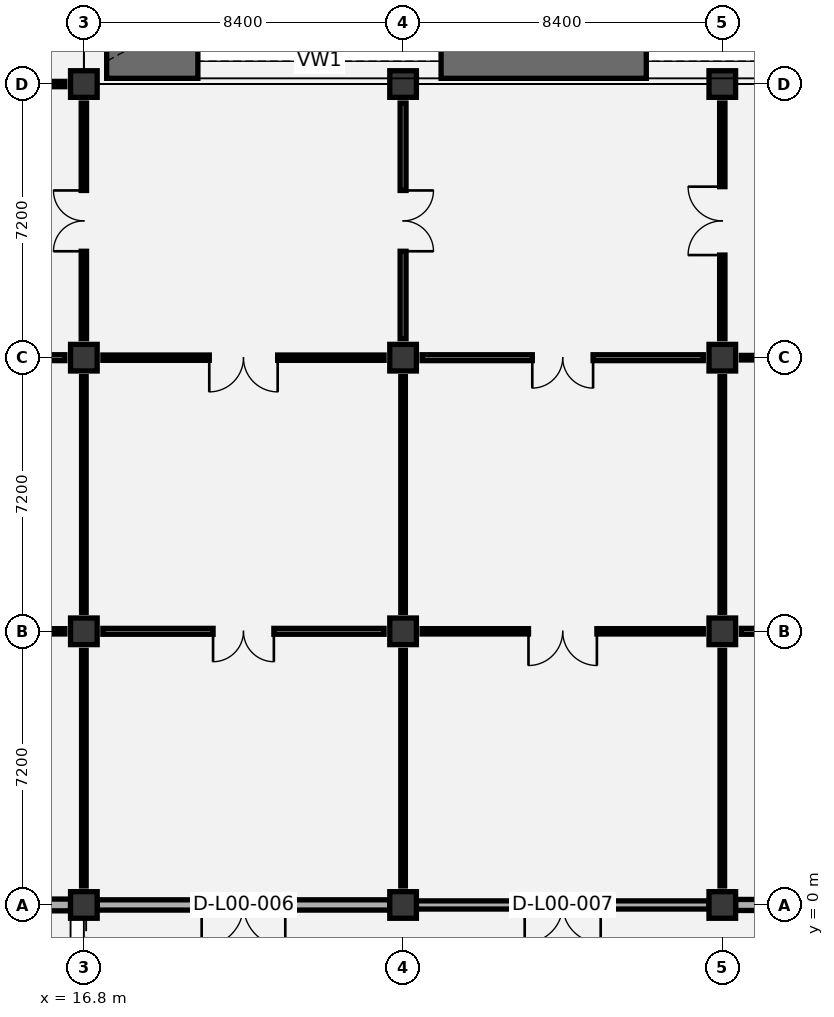
"""IFC4 building model, lengths in metres.
Left out: names, types, materials, properties, quantities, classifications, styles, units other than length and angle.
Written with IfcOpenShell. Run it as: python <this file> out.ifc"""

import sys

from ifc_helpers import new_model, si_unit, direction, frame, frame_2d, origin, origin_2d, place, context, subcontext, project, spatial, rectangle, extrude, element, fill, save


model = new_model("IFC4")
c1 = context("Model", 3, precision=1e-05, world=origin(), true_north=direction((0.0, 1.0)))
c2 = subcontext(c1, "Body", "Model", "MODEL_VIEW")
j1 = project(units=[si_unit("LENGTHUNIT", "METRE"), si_unit("PLANEANGLEUNIT", "RADIAN")], contexts=[c1])
p1 = place(None, origin())
s1 = spatial("IfcSite", under=j1, at=p1, CompositionType="ELEMENT")
p2 = place(p1, origin())
s2 = spatial("IfcBuilding", under=s1, at=p2, CompositionType="ELEMENT")
p3 = place(p2, origin())
s3 = spatial("IfcBuildingStorey", under=s2, at=p3, CompositionType="ELEMENT", Elevation=0.0)
for number, where, z_axis, x_axis in (
    (1, (16.8, 0.0, 0.0), (0.0, 0.0, 1.0), (1.0, 0.0, 0.0)),
    (2, (16.8, 7.2, 0.0), (0.0, 0.0, 1.0), (1.0, 0.0, 0.0)),
    (3, (16.8, 14.4, 0.0), (0.0, 0.0, 1.0), (1.0, 0.0, 0.0)),
    (4, (16.8, 21.6, 0.0), (0.0, 0.0, 1.0), (1.0, 0.0, 0.0)),
    (5, (25.2, 0.0, 0.0), (0.0, 0.0, 1.0), (1.0, 0.0, 0.0)),
    (6, (25.2, 7.2, 0.0), (0.0, 0.0, 1.0), (1.0, 0.0, 0.0)),
    (7, (25.2, 14.4, 0.0), (0.0, 0.0, 1.0), (1.0, 0.0, 0.0)),
    (8, (25.2, 21.6, 0.0), (0.0, 0.0, 1.0), (1.0, 0.0, 0.0)),
    (9, (33.6, 0.0, 0.0), (0.0, 0.0, 1.0), (1.0, 0.0, 0.0)),
    (10, (33.6, 7.2, 0.0), (0.0, 0.0, 1.0), (1.0, 0.0, 0.0)),
    (11, (33.6, 14.4, 0.0), (0.0, 0.0, 1.0), (1.0, 0.0, 0.0)),
    (12, (33.6, 21.6, 0.0), (0.0, 0.0, 1.0), (1.0, 0.0, 0.0)),
):
    element("IfcColumn", number, at=place(p3, frame(where, z_axis=z_axis, x_axis=x_axis)), inside=s3, PredefinedType="COLUMN", context=c2, shape_type="SweptSolid", body=[
        extrude(rectangle(XDim=0.7, YDim=0.7, at=origin_2d()), origin(), (0.0, 0.0, 1.0), 6.0),
    ])
p4 = place(p3, frame((17.4, 22.2, 0.0), z_axis=(0.0, 0.0, 1.0), x_axis=(1.0, 0.0, 0.0)))
e13 = element("IfcWall", 13, at=p4, inside=s3, PredefinedType="SOLIDWALL", context=c2, shape_type="SweptSolid", body=[
    extrude(rectangle(XDim=24.0, YDim=0.9, at=frame_2d((12.0, 0.0))), origin(), (0.0, 0.0, 1.0), 6.0),
])
p5 = place(p4, frame((2.4, 0.0, 0.8)))
e14 = element("IfcOpeningElement", 14, at=p5, cuts=e13, PredefinedType="OPENING", context=c2, shape_type="SweptSolid", body=[
    extrude(rectangle(XDim=6.4, YDim=3.2, at=frame_2d((3.2, 1.6))), frame((0.0, 0.46, 0.0), z_axis=(0.0, -1.0, 0.0), x_axis=(1.0, 0.0, 0.0)), (0.0, 0.0, 1.0), 0.92),
])
p6 = place(p4, frame((14.2, 0.0, 0.8)))
e15 = element("IfcOpeningElement", 15, at=p6, cuts=e13, PredefinedType="OPENING", context=c2, shape_type="SweptSolid", body=[
    extrude(rectangle(XDim=6.4, YDim=3.2, at=frame_2d((3.2, 1.6))), frame((0.0, 0.46, 0.0), z_axis=(0.0, -1.0, 0.0), x_axis=(1.0, 0.0, 0.0)), (0.0, 0.0, 1.0), 0.92),
])
p7 = place(p3, frame((8.75, 0.0, 0.0), z_axis=(0.0, 0.0, 1.0), x_axis=(1.0, 0.0, 0.0)))
e16 = element("IfcWall", 16, at=p7, inside=s3, PredefinedType="SOLIDWALL", context=c2, shape_type="SweptSolid", body=[
    extrude(rectangle(XDim=7.7, YDim=0.31, at=frame_2d((3.85, 0.0))), origin(), (0.0, 0.0, 1.0), 5.12),
])
p8 = place(p7, frame((3.05, 0.0, 0.0)))
e17 = element("IfcOpeningElement", 17, at=p8, cuts=e16, PredefinedType="OPENING", context=c2, shape_type="SweptSolid", body=[
    extrude(rectangle(XDim=1.6, YDim=2.25, at=frame_2d((0.8, 1.125))), frame((0.0, 0.165, 0.0), z_axis=(0.0, -1.0, 0.0), x_axis=(1.0, 0.0, 0.0)), (0.0, 0.0, 1.0), 0.33),
])
p9 = place(p3, frame((17.15, 0.0, 0.0), z_axis=(0.0, 0.0, 1.0), x_axis=(1.0, 0.0, 0.0)))
e18 = element("IfcWall", 18, at=p9, inside=s3, PredefinedType="SOLIDWALL", context=c2, shape_type="SweptSolid", body=[
    extrude(rectangle(XDim=7.7, YDim=0.27, at=frame_2d((3.85, 0.0))), origin(), (0.0, 0.0, 1.0), 5.02),
])
p10 = place(p9, frame((2.75, 0.0, 0.0)))
e19 = element("IfcOpeningElement", 19, at=p10, cuts=e18, PredefinedType="OPENING", context=c2, shape_type="SweptSolid", body=[
    extrude(rectangle(XDim=2.2, YDim=2.45, at=frame_2d((1.1, 1.225))), frame((0.0, 0.145, 0.0), z_axis=(0.0, -1.0, 0.0), x_axis=(1.0, 0.0, 0.0)), (0.0, 0.0, 1.0), 0.29),
])
p11 = place(p3, frame((25.55, 0.0, 0.0), z_axis=(0.0, 0.0, 1.0), x_axis=(1.0, 0.0, 0.0)))
e20 = element("IfcWall", 20, at=p11, inside=s3, PredefinedType="SOLIDWALL", context=c2, shape_type="SweptSolid", body=[
    extrude(rectangle(XDim=7.7, YDim=0.215, at=frame_2d((3.85, 0.0))), origin(), (0.0, 0.0, 1.0), 5.02),
])
p12 = place(p11, frame((2.85, 0.0, 0.0)))
e21 = element("IfcOpeningElement", 21, at=p12, cuts=e20, PredefinedType="OPENING", context=c2, shape_type="SweptSolid", body=[
    extrude(rectangle(XDim=2.0, YDim=2.4, at=frame_2d((1.0, 1.2))), frame((0.0, 0.117, 0.0), z_axis=(0.0, -1.0, 0.0), x_axis=(1.0, 0.0, 0.0)), (0.0, 0.0, 1.0), 0.235),
])
p13 = place(p3, frame((33.95, 0.0, 0.0), z_axis=(0.0, 0.0, 1.0), x_axis=(1.0, 0.0, 0.0)))
e22 = element("IfcWall", 22, at=p13, inside=s3, PredefinedType="SOLIDWALL", context=c2, shape_type="SweptSolid", body=[
    extrude(rectangle(XDim=7.7, YDim=0.29, at=frame_2d((3.85, 0.0))), origin(), (0.0, 0.0, 1.0), 5.02),
])
p14 = place(p13, frame((2.95, 0.0, 0.0)))
e23 = element("IfcOpeningElement", 23, at=p14, cuts=e22, PredefinedType="OPENING", context=c2, shape_type="SweptSolid", body=[
    extrude(rectangle(XDim=1.8, YDim=2.35, at=frame_2d((0.9, 1.175))), frame((0.0, 0.155, 0.0), z_axis=(0.0, -1.0, 0.0), x_axis=(1.0, 0.0, 0.0)), (0.0, 0.0, 1.0), 0.31),
])
p15 = place(p3, frame((16.8, 0.5, 0.0), z_axis=(0.0, 0.0, 1.0), x_axis=(0.0, 1.0, 0.0)))
e24 = element("IfcWall", 24, at=p15, inside=s3, PredefinedType="PARTITIONING", context=c2, shape_type="SweptSolid", body=[
    extrude(rectangle(XDim=6.2, YDim=0.12, at=frame_2d((3.1, 0.0))), origin(), (0.0, 0.0, 1.0), 5.38),
])
p16 = place(p3, frame((8.9, 7.2, 0.0), z_axis=(0.0, 0.0, 1.0), x_axis=(1.0, 0.0, 0.0)))
e25 = element("IfcWall", 25, at=p16, inside=s3, PredefinedType="PARTITIONING", context=c2, shape_type="SweptSolid", body=[
    extrude(rectangle(XDim=7.4, YDim=0.14, at=frame_2d((3.7, 0.0))), origin(), (0.0, 0.0, 1.0), 4.97),
])
p17 = place(p16, frame((2.9, 0.0, 0.0)))
e26 = element("IfcOpeningElement", 26, at=p17, cuts=e25, PredefinedType="OPENING", context=c2, shape_type="SweptSolid", body=[
    extrude(rectangle(XDim=1.6, YDim=2.2, at=frame_2d((0.8, 1.1))), frame((0.0, 0.08, 0.0), z_axis=(0.0, -1.0, 0.0), x_axis=(1.0, 0.0, 0.0)), (0.0, 0.0, 1.0), 0.16),
])
p18 = place(p3, frame((16.8, 7.7, 0.0), z_axis=(0.0, 0.0, 1.0), x_axis=(0.0, 1.0, 0.0)))
e27 = element("IfcWall", 27, at=p18, inside=s3, PredefinedType="PARTITIONING", context=c2, shape_type="SweptSolid", body=[
    extrude(rectangle(XDim=6.2, YDim=0.12, at=frame_2d((3.1, 0.0))), origin(), (0.0, 0.0, 1.0), 4.92),
])
p19 = place(p3, frame((8.9, 14.4, 0.0), z_axis=(0.0, 0.0, 1.0), x_axis=(1.0, 0.0, 0.0)))
e28 = element("IfcWall", 28, at=p19, inside=s3, PredefinedType="PARTITIONING", context=c2, shape_type="SweptSolid", body=[
    extrude(rectangle(XDim=7.4, YDim=0.155, at=frame_2d((3.7, 0.0))), origin(), (0.0, 0.0, 1.0), 4.87),
])
p20 = place(p19, frame((2.8, 0.0, 0.0)))
e29 = element("IfcOpeningElement", 29, at=p20, cuts=e28, PredefinedType="OPENING", context=c2, shape_type="SweptSolid", body=[
    extrude(rectangle(XDim=1.8, YDim=2.25, at=frame_2d((0.9, 1.125))), frame((0.0, 0.087, 0.0), z_axis=(0.0, -1.0, 0.0), x_axis=(1.0, 0.0, 0.0)), (0.0, 0.0, 1.0), 0.175),
])
p21 = place(p3, frame((16.8, 14.9, 0.0), z_axis=(0.0, 0.0, 1.0), x_axis=(0.0, 1.0, 0.0)))
e30 = element("IfcWall", 30, at=p21, inside=s3, PredefinedType="PARTITIONING", context=c2, shape_type="SweptSolid", body=[
    extrude(rectangle(XDim=6.2, YDim=0.14, at=frame_2d((3.1, 0.0))), origin(), (0.0, 0.0, 1.0), 5.02),
])
p22 = place(p21, frame((2.3, 0.0, 0.0)))
e31 = element("IfcOpeningElement", 31, at=p22, cuts=e30, PredefinedType="OPENING", context=c2, shape_type="SweptSolid", body=[
    extrude(rectangle(XDim=1.6, YDim=2.2, at=frame_2d((0.8, 1.1))), frame((0.0, 0.08, 0.0), z_axis=(0.0, -1.0, 0.0), x_axis=(1.0, 0.0, 0.0)), (0.0, 0.0, 1.0), 0.16),
])
p23 = place(p3, frame((8.9, 21.6, 0.0), z_axis=(0.0, 0.0, 1.0), x_axis=(1.0, 0.0, 0.0)))
e32 = element("IfcWall", 32, at=p23, inside=s3, PredefinedType="PARTITIONING", context=c2, shape_type="SweptSolid", body=[
    extrude(rectangle(XDim=7.4, YDim=0.14, at=frame_2d((3.7, 0.0))), origin(), (0.0, 0.0, 1.0), 4.87),
])
p24 = place(p23, frame((2.8, 0.0, 0.0)))
e33 = element("IfcOpeningElement", 33, at=p24, cuts=e32, PredefinedType="OPENING", context=c2, shape_type="SweptSolid", body=[
    extrude(rectangle(XDim=1.8, YDim=2.25, at=frame_2d((0.9, 1.125))), frame((0.0, 0.08, 0.0), z_axis=(0.0, -1.0, 0.0), x_axis=(1.0, 0.0, 0.0)), (0.0, 0.0, 1.0), 0.16),
])
p25 = place(p3, frame((25.2, 0.5, 0.0), z_axis=(0.0, 0.0, 1.0), x_axis=(0.0, 1.0, 0.0)))
e34 = element("IfcWall", 34, at=p25, inside=s3, PredefinedType="PARTITIONING", context=c2, shape_type="SweptSolid", body=[
    extrude(rectangle(XDim=6.2, YDim=0.12, at=frame_2d((3.1, 0.0))), origin(), (0.0, 0.0, 1.0), 4.92),
])
p26 = place(p3, frame((17.3, 7.2, 0.0), z_axis=(0.0, 0.0, 1.0), x_axis=(1.0, 0.0, 0.0)))
e35 = element("IfcWall", 35, at=p26, inside=s3, PredefinedType="PARTITIONING", context=c2, shape_type="SweptSolid", body=[
    extrude(rectangle(XDim=7.4, YDim=0.155, at=frame_2d((3.7, 0.0))), origin(), (0.0, 0.0, 1.0), 4.87),
])
p27 = place(p26, frame((2.9, 0.0, 0.0)))
e36 = element("IfcOpeningElement", 36, at=p27, cuts=e35, PredefinedType="OPENING", context=c2, shape_type="SweptSolid", body=[
    extrude(rectangle(XDim=1.6, YDim=2.2, at=frame_2d((0.8, 1.1))), frame((0.0, 0.087, 0.0), z_axis=(0.0, -1.0, 0.0), x_axis=(1.0, 0.0, 0.0)), (0.0, 0.0, 1.0), 0.175),
])
p28 = place(p3, frame((25.2, 7.7, 0.0), z_axis=(0.0, 0.0, 1.0), x_axis=(0.0, 1.0, 0.0)))
e37 = element("IfcWall", 37, at=p28, inside=s3, PredefinedType="PARTITIONING", context=c2, shape_type="SweptSolid", body=[
    extrude(rectangle(XDim=6.2, YDim=0.12, at=frame_2d((3.1, 0.0))), origin(), (0.0, 0.0, 1.0), 5.17),
])
p29 = place(p3, frame((17.3, 14.4, 0.0), z_axis=(0.0, 0.0, 1.0), x_axis=(1.0, 0.0, 0.0)))
e38 = element("IfcWall", 38, at=p29, inside=s3, PredefinedType="PARTITIONING", context=c2, shape_type="SweptSolid", body=[
    extrude(rectangle(XDim=7.4, YDim=0.14, at=frame_2d((3.7, 0.0))), origin(), (0.0, 0.0, 1.0), 5.02),
])
p30 = place(p29, frame((2.8, 0.0, 0.0)))
e39 = element("IfcOpeningElement", 39, at=p30, cuts=e38, PredefinedType="OPENING", context=c2, shape_type="SweptSolid", body=[
    extrude(rectangle(XDim=1.8, YDim=2.25, at=frame_2d((0.9, 1.125))), frame((0.0, 0.08, 0.0), z_axis=(0.0, -1.0, 0.0), x_axis=(1.0, 0.0, 0.0)), (0.0, 0.0, 1.0), 0.16),
])
p31 = place(p3, frame((25.2, 14.9, 0.0), z_axis=(0.0, 0.0, 1.0), x_axis=(0.0, 1.0, 0.0)))
e40 = element("IfcWall", 40, at=p31, inside=s3, PredefinedType="PARTITIONING", context=c2, shape_type="SweptSolid", body=[
    extrude(rectangle(XDim=6.2, YDim=0.155, at=frame_2d((3.1, 0.0))), origin(), (0.0, 0.0, 1.0), 5.775),
])
p32 = place(p31, frame((2.3, 0.0, 0.0)))
e41 = element("IfcOpeningElement", 41, at=p32, cuts=e40, PredefinedType="OPENING", context=c2, shape_type="SweptSolid", body=[
    extrude(rectangle(XDim=1.6, YDim=2.2, at=frame_2d((0.8, 1.1))), frame((0.0, 0.087, 0.0), z_axis=(0.0, -1.0, 0.0), x_axis=(1.0, 0.0, 0.0)), (0.0, 0.0, 1.0), 0.175),
])
p33 = place(p3, frame((33.6, 0.5, 0.0), z_axis=(0.0, 0.0, 1.0), x_axis=(0.0, 1.0, 0.0)))
e42 = element("IfcWall", 42, at=p33, inside=s3, PredefinedType="PARTITIONING", context=c2, shape_type="SweptSolid", body=[
    extrude(rectangle(XDim=6.2, YDim=0.12, at=frame_2d((3.1, 0.0))), origin(), (0.0, 0.0, 1.0), 5.17),
])
p34 = place(p3, frame((25.7, 7.2, 0.0), z_axis=(0.0, 0.0, 1.0), x_axis=(1.0, 0.0, 0.0)))
e43 = element("IfcWall", 43, at=p34, inside=s3, PredefinedType="PARTITIONING", context=c2, shape_type="SweptSolid", body=[
    extrude(rectangle(XDim=7.4, YDim=0.14, at=frame_2d((3.7, 0.0))), origin(), (0.0, 0.0, 1.0), 4.87),
])
p35 = place(p34, frame((2.8, 0.0, 0.0)))
e44 = element("IfcOpeningElement", 44, at=p35, cuts=e43, PredefinedType="OPENING", context=c2, shape_type="SweptSolid", body=[
    extrude(rectangle(XDim=1.8, YDim=2.25, at=frame_2d((0.9, 1.125))), frame((0.0, 0.08, 0.0), z_axis=(0.0, -1.0, 0.0), x_axis=(1.0, 0.0, 0.0)), (0.0, 0.0, 1.0), 0.16),
])
p36 = place(p3, frame((33.6, 7.7, 0.0), z_axis=(0.0, 0.0, 1.0), x_axis=(0.0, 1.0, 0.0)))
e45 = element("IfcWall", 45, at=p36, inside=s3, PredefinedType="PARTITIONING", context=c2, shape_type="SweptSolid", body=[
    extrude(rectangle(XDim=6.2, YDim=0.12, at=frame_2d((3.1, 0.0))), origin(), (0.0, 0.0, 1.0), 4.92),
])
p37 = place(p3, frame((25.7, 14.4, 0.0), z_axis=(0.0, 0.0, 1.0), x_axis=(1.0, 0.0, 0.0)))
e46 = element("IfcWall", 46, at=p37, inside=s3, PredefinedType="PARTITIONING", context=c2, shape_type="SweptSolid", body=[
    extrude(rectangle(XDim=7.4, YDim=0.155, at=frame_2d((3.7, 0.0))), origin(), (0.0, 0.0, 1.0), 5.02),
])
p38 = place(p37, frame((2.9, 0.0, 0.0)))
e47 = element("IfcOpeningElement", 47, at=p38, cuts=e46, PredefinedType="OPENING", context=c2, shape_type="SweptSolid", body=[
    extrude(rectangle(XDim=1.6, YDim=2.2, at=frame_2d((0.8, 1.1))), frame((0.0, 0.087, 0.0), z_axis=(0.0, -1.0, 0.0), x_axis=(1.0, 0.0, 0.0)), (0.0, 0.0, 1.0), 0.175),
])
p39 = place(p3, frame((33.6, 14.9, 0.0), z_axis=(0.0, 0.0, 1.0), x_axis=(0.0, 1.0, 0.0)))
e48 = element("IfcWall", 48, at=p39, inside=s3, PredefinedType="PARTITIONING", context=c2, shape_type="SweptSolid", body=[
    extrude(rectangle(XDim=6.2, YDim=0.14, at=frame_2d((3.1, 0.0))), origin(), (0.0, 0.0, 1.0), 5.775),
])
p40 = place(p39, frame((2.2, 0.0, 0.0)))
e49 = element("IfcOpeningElement", 49, at=p40, cuts=e48, PredefinedType="OPENING", context=c2, shape_type="SweptSolid", body=[
    extrude(rectangle(XDim=1.8, YDim=2.25, at=frame_2d((0.9, 1.125))), frame((0.0, 0.08, 0.0), z_axis=(0.0, -1.0, 0.0), x_axis=(1.0, 0.0, 0.0)), (0.0, 0.0, 1.0), 0.16),
])
p41 = place(p3, frame((34.1, 7.2, 0.0), z_axis=(0.0, 0.0, 1.0), x_axis=(1.0, 0.0, 0.0)))
e50 = element("IfcWall", 50, at=p41, inside=s3, PredefinedType="PARTITIONING", context=c2, shape_type="SweptSolid", body=[
    extrude(rectangle(XDim=7.4, YDim=0.155, at=frame_2d((3.7, 0.0))), origin(), (0.0, 0.0, 1.0), 4.87),
])
p42 = place(p41, frame((2.8, 0.0, 0.0)))
e51 = element("IfcOpeningElement", 51, at=p42, cuts=e50, PredefinedType="OPENING", context=c2, shape_type="SweptSolid", body=[
    extrude(rectangle(XDim=1.8, YDim=2.25, at=frame_2d((0.9, 1.125))), frame((0.0, 0.087, 0.0), z_axis=(0.0, -1.0, 0.0), x_axis=(1.0, 0.0, 0.0)), (0.0, 0.0, 1.0), 0.175),
])
p43 = place(p3, frame((34.1, 14.4, 0.0), z_axis=(0.0, 0.0, 1.0), x_axis=(1.0, 0.0, 0.0)))
e52 = element("IfcWall", 52, at=p43, inside=s3, PredefinedType="PARTITIONING", context=c2, shape_type="SweptSolid", body=[
    extrude(rectangle(XDim=7.4, YDim=0.12, at=frame_2d((3.7, 0.0))), origin(), (0.0, 0.0, 1.0), 5.02),
])
p44 = place(p10, frame((2.2, 0.0, 0.0), z_axis=(0.0, 0.0, 1.0), x_axis=(-1.0, 0.0, 0.0)))
e53 = element("IfcDoor", 53, at=p44, inside=s3, OperationType="DOUBLE_DOOR_SINGLE_SWING", PredefinedType="DOOR", context=c2, shape_type="SweptSolid", body=[
    extrude(rectangle(XDim=2.2, YDim=2.45, at=frame_2d((1.1, 1.225))), frame((0.0, 0.025, 0.0), z_axis=(0.0, -1.0, 0.0), x_axis=(1.0, 0.0, 0.0)), (0.0, 0.0, 1.0), 0.05),
])
fill(e19, e53)
p45 = place(p12, frame((2.0, 0.0, 0.0), z_axis=(0.0, 0.0, 1.0), x_axis=(-1.0, 0.0, 0.0)))
e54 = element("IfcDoor", 54, at=p45, inside=s3, OperationType="DOUBLE_DOOR_SINGLE_SWING", PredefinedType="DOOR", context=c2, shape_type="SweptSolid", body=[
    extrude(rectangle(XDim=2.0, YDim=2.4, at=frame_2d((1.0, 1.2))), frame((0.0, 0.025, 0.0), z_axis=(0.0, -1.0, 0.0), x_axis=(1.0, 0.0, 0.0)), (0.0, 0.0, 1.0), 0.05),
])
fill(e21, e54)
p46 = place(p5, origin())
e55 = element("IfcWindow", 55, at=p46, inside=s3, PartitioningType="SINGLE_PANEL", PredefinedType="WINDOW", context=c2, shape_type="SweptSolid", body=[
    extrude(rectangle(XDim=6.4, YDim=3.2, at=frame_2d((3.2, 1.6))), frame((0.0, 0.175, 0.0), z_axis=(0.0, -1.0, 0.0), x_axis=(1.0, 0.0, 0.0)), (0.0, 0.0, 1.0), 0.35),
])
fill(e14, e55)
p47 = place(p6, origin())
e56 = element("IfcWindow", 56, at=p47, inside=s3, PartitioningType="SINGLE_PANEL", PredefinedType="WINDOW", context=c2, shape_type="SweptSolid", body=[
    extrude(rectangle(XDim=6.4, YDim=3.2, at=frame_2d((3.2, 1.6))), frame((0.0, 0.175, 0.0), z_axis=(0.0, -1.0, 0.0), x_axis=(1.0, 0.0, 0.0)), (0.0, 0.0, 1.0), 0.35),
])
fill(e15, e56)
p48 = place(p22, origin())
e57 = element("IfcDoor", 57, at=p48, inside=s3, OperationType="DOUBLE_DOOR_SINGLE_SWING", PredefinedType="DOOR", context=c2, shape_type="SweptSolid", body=[
    extrude(rectangle(XDim=1.6, YDim=2.2, at=frame_2d((0.8, 1.1))), frame((0.0, 0.025, 0.0), z_axis=(0.0, -1.0, 0.0), x_axis=(1.0, 0.0, 0.0)), (0.0, 0.0, 1.0), 0.05),
])
fill(e31, e57)
p49 = place(p27, frame((1.6, 0.0, 0.0), z_axis=(0.0, 0.0, 1.0), x_axis=(-1.0, 0.0, 0.0)))
e58 = element("IfcDoor", 58, at=p49, inside=s3, OperationType="DOUBLE_DOOR_SINGLE_SWING", PredefinedType="DOOR", context=c2, shape_type="SweptSolid", body=[
    extrude(rectangle(XDim=1.6, YDim=2.2, at=frame_2d((0.8, 1.1))), frame((0.0, 0.025, 0.0), z_axis=(0.0, -1.0, 0.0), x_axis=(1.0, 0.0, 0.0)), (0.0, 0.0, 1.0), 0.05),
])
fill(e36, e58)
p50 = place(p30, frame((1.8, 0.0, 0.0), z_axis=(0.0, 0.0, 1.0), x_axis=(-1.0, 0.0, 0.0)))
e59 = element("IfcDoor", 59, at=p50, inside=s3, OperationType="DOUBLE_DOOR_SINGLE_SWING", PredefinedType="DOOR", context=c2, shape_type="SweptSolid", body=[
    extrude(rectangle(XDim=1.8, YDim=2.25, at=frame_2d((0.9, 1.125))), frame((0.0, 0.025, 0.0), z_axis=(0.0, -1.0, 0.0), x_axis=(1.0, 0.0, 0.0)), (0.0, 0.0, 1.0), 0.05),
])
fill(e39, e59)
p51 = place(p32, frame((1.6, 0.0, 0.0), z_axis=(0.0, 0.0, 1.0), x_axis=(-1.0, 0.0, 0.0)))
e60 = element("IfcDoor", 60, at=p51, inside=s3, OperationType="DOUBLE_DOOR_SINGLE_SWING", PredefinedType="DOOR", context=c2, shape_type="SweptSolid", body=[
    extrude(rectangle(XDim=1.6, YDim=2.2, at=frame_2d((0.8, 1.1))), frame((0.0, 0.025, 0.0), z_axis=(0.0, -1.0, 0.0), x_axis=(1.0, 0.0, 0.0)), (0.0, 0.0, 1.0), 0.05),
])
fill(e41, e60)
p52 = place(p35, frame((1.8, 0.0, 0.0), z_axis=(0.0, 0.0, 1.0), x_axis=(-1.0, 0.0, 0.0)))
e61 = element("IfcDoor", 61, at=p52, inside=s3, OperationType="DOUBLE_DOOR_SINGLE_SWING", PredefinedType="DOOR", context=c2, shape_type="SweptSolid", body=[
    extrude(rectangle(XDim=1.8, YDim=2.25, at=frame_2d((0.9, 1.125))), frame((0.0, 0.025, 0.0), z_axis=(0.0, -1.0, 0.0), x_axis=(1.0, 0.0, 0.0)), (0.0, 0.0, 1.0), 0.05),
])
fill(e44, e61)
p53 = place(p38, frame((1.6, 0.0, 0.0), z_axis=(0.0, 0.0, 1.0), x_axis=(-1.0, 0.0, 0.0)))
e62 = element("IfcDoor", 62, at=p53, inside=s3, OperationType="DOUBLE_DOOR_SINGLE_SWING", PredefinedType="DOOR", context=c2, shape_type="SweptSolid", body=[
    extrude(rectangle(XDim=1.6, YDim=2.2, at=frame_2d((0.8, 1.1))), frame((0.0, 0.025, 0.0), z_axis=(0.0, -1.0, 0.0), x_axis=(1.0, 0.0, 0.0)), (0.0, 0.0, 1.0), 0.05),
])
fill(e47, e62)
p54 = place(p40, origin())
e63 = element("IfcDoor", 63, at=p54, inside=s3, OperationType="DOUBLE_DOOR_SINGLE_SWING", PredefinedType="DOOR", context=c2, shape_type="SweptSolid", body=[
    extrude(rectangle(XDim=1.8, YDim=2.25, at=frame_2d((0.9, 1.125))), frame((0.0, 0.025, 0.0), z_axis=(0.0, -1.0, 0.0), x_axis=(1.0, 0.0, 0.0)), (0.0, 0.0, 1.0), 0.05),
])
fill(e49, e63)
save(model, sys.argv[1])
